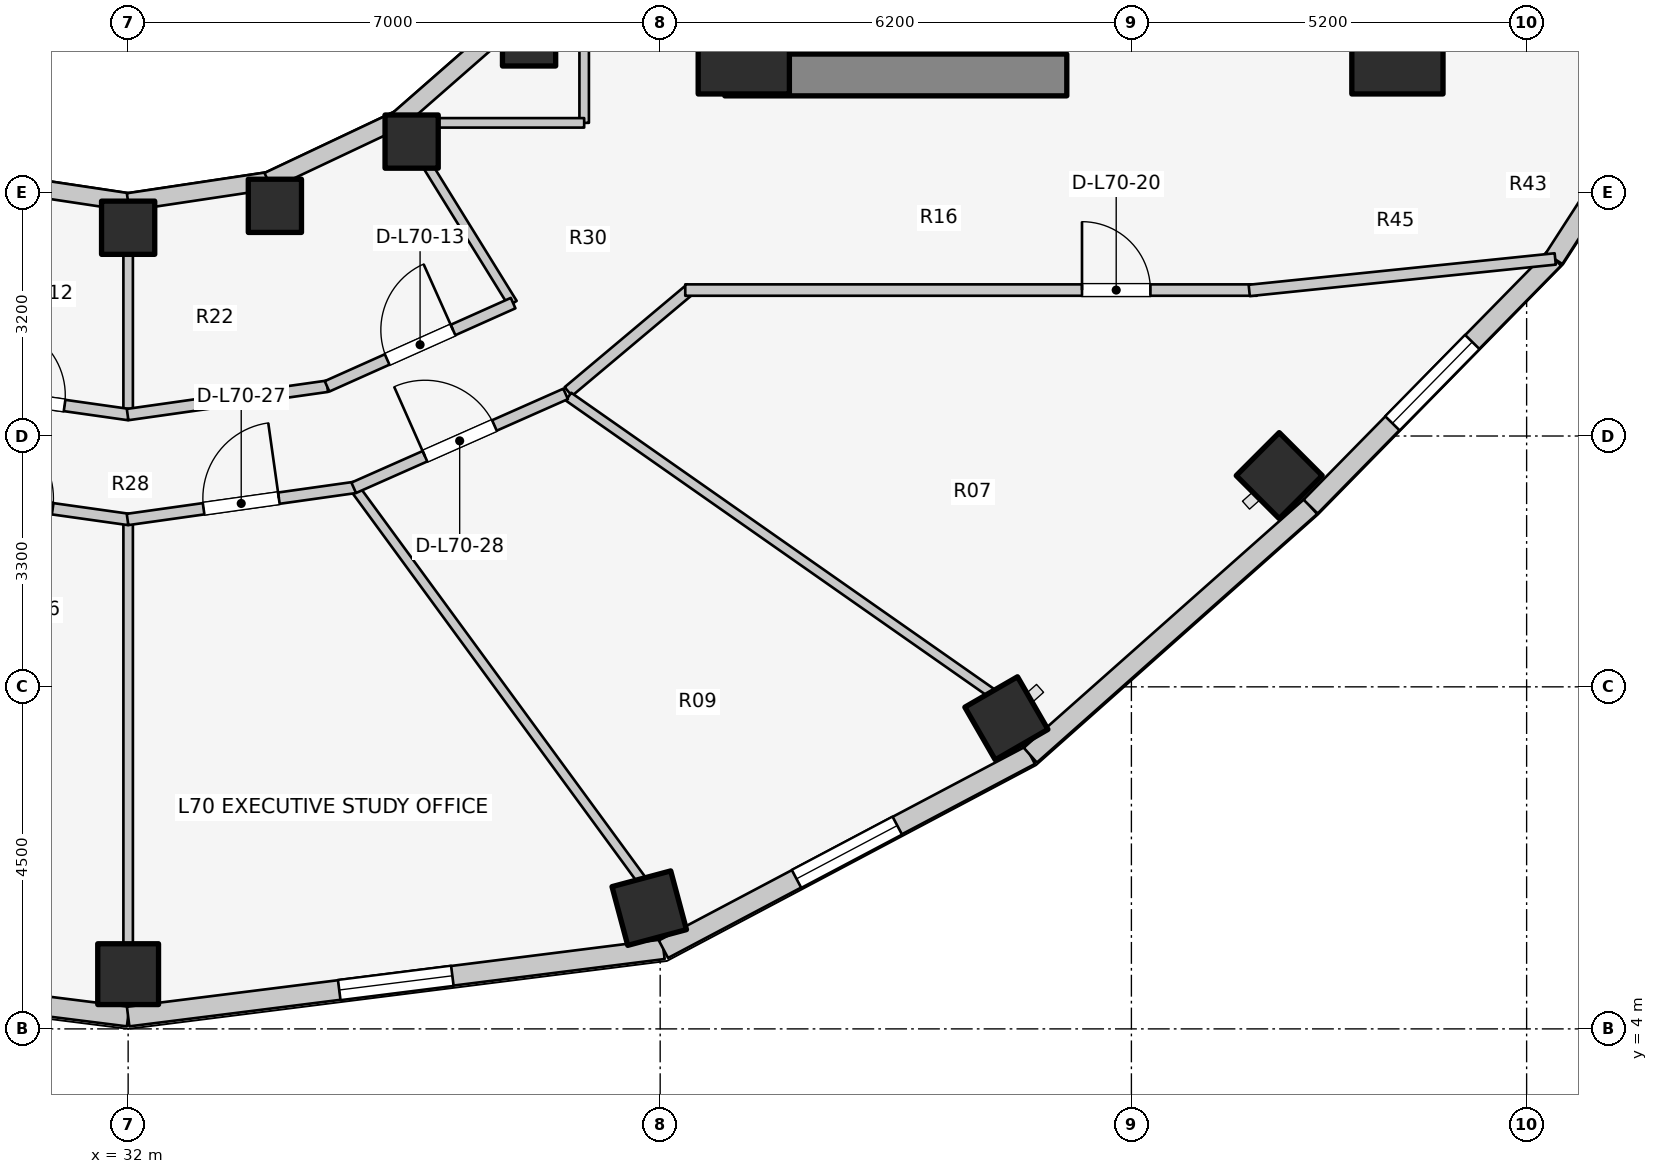
"""IFC4 building model, lengths in metres.
Left out: names, types, materials, properties, quantities, classifications, styles, units other than length and angle.
Written with IfcOpenShell. Run it as: python <this file> out.ifc"""

import sys

from ifc_helpers import new_model, si_unit, direction, frame, frame_2d, origin, origin_2d, place, context, subcontext, project, spatial, rectangle, extrude, element, fill, save


model = new_model("IFC4")
c1 = context("Model", 3, precision=1e-05, world=origin(), true_north=direction((0.0, 1.0)))
c2 = subcontext(c1, "Body", "Model", "MODEL_VIEW")
j1 = project(units=[si_unit("LENGTHUNIT", "METRE"), si_unit("PLANEANGLEUNIT", "RADIAN")], contexts=[c1])
p1 = place(None, origin())
s1 = spatial("IfcSite", under=j1, at=p1, CompositionType="ELEMENT")
p2 = place(p1, origin())
s2 = spatial("IfcBuilding", under=s1, at=p2, CompositionType="ELEMENT")
p3 = place(p2, frame((0.0, 0.0, 229.5)))
s3 = spatial("IfcBuildingStorey", under=s2, at=p3, CompositionType="ELEMENT", Elevation=229.5)
p4 = place(p3, frame((39.85, 16.55, 0.0), z_axis=(0.0, 0.0, 1.0), x_axis=(1.0, 0.0, 0.0)))
e1 = element("IfcWall", 1, at=p4, inside=s3, PredefinedType="SHEAR", context=c2, shape_type="SweptSolid", body=[
    extrude(rectangle(XDim=4.5, YDim=0.55, at=frame_2d((2.25, 0.0))), origin(), (0.0, 0.0, 1.0), 3.1),
])
for number, where, z_axis, x_axis in (
    (2, (40.1, 16.9, 0.0), (0.0, 0.0, 1.0), (1.0, 0.0, 0.0)),
    (3, (48.7, 16.9, 0.0), (0.0, 0.0, 1.0), (1.0, 0.0, 0.0)),
):
    element("IfcColumn", number, at=place(p3, frame(where, z_axis=z_axis, x_axis=x_axis)), inside=s3, PredefinedType="COLUMN", context=c2, shape_type="SweptSolid", body=[
        extrude(rectangle(XDim=1.2, YDim=1.2, at=origin_2d()), origin(), (0.0, 0.0, 1.0), 3.1),
    ])
p5 = place(p3, frame((32.0, 14.54, 0.0), z_axis=(0.0, 0.0, 1.0), x_axis=(1.0, 0.0, 0.0)))
e4 = element("IfcColumn", 4, at=p5, inside=s3, PredefinedType="COLUMN", context=c2, shape_type="SweptSolid", body=[
    extrude(rectangle(XDim=0.7, YDim=0.7, at=origin_2d()), origin(), (0.0, 0.0, 1.0), 3.1),
])
p6 = place(p3, frame((32.0, 4.72, 0.0), z_axis=(0.0, 0.0, 1.0), x_axis=(0.0, -1.0, 0.0)))
e5 = element("IfcColumn", 5, at=p6, inside=s3, PredefinedType="COLUMN", context=c2, shape_type="SweptSolid", body=[
    extrude(rectangle(XDim=0.8, YDim=0.8, at=origin_2d()), origin(), (0.0, 0.0, 1.0), 3.1),
])
p7 = place(p3, frame((33.931, 14.828, 0.0), z_axis=(0.0, 0.0, 1.0), x_axis=(1.0, 0.0, 0.0)))
e6 = element("IfcColumn", 6, at=p7, inside=s3, PredefinedType="COLUMN", context=c2, shape_type="SweptSolid", body=[
    extrude(rectangle(XDim=0.7, YDim=0.7, at=origin_2d()), origin(), (0.0, 0.0, 1.0), 3.1),
])
p8 = place(p3, frame((38.856, 5.589, 0.0), z_axis=(0.0, 0.0, 1.0), x_axis=(0.258819045103, -0.965925826289, 0.0)))
e7 = element("IfcColumn", 7, at=p8, inside=s3, PredefinedType="COLUMN", context=c2, shape_type="SweptSolid", body=[
    extrude(rectangle(XDim=0.8, YDim=0.8, at=origin_2d()), origin(), (0.0, 0.0, 1.0), 3.1),
])
p9 = place(p3, frame((35.73, 15.673, 0.0), z_axis=(0.0, 0.0, 1.0), x_axis=(1.0, 0.0, 0.0)))
e8 = element("IfcColumn", 8, at=p9, inside=s3, PredefinedType="COLUMN", context=c2, shape_type="SweptSolid", body=[
    extrude(rectangle(XDim=0.7, YDim=0.7, at=origin_2d()), origin(), (0.0, 0.0, 1.0), 3.1),
])
p10 = place(p3, frame((43.555, 8.086, 0.0), z_axis=(0.0, 0.0, 1.0), x_axis=(0.5, -0.866025403784, 0.0)))
e9 = element("IfcColumn", 9, at=p10, inside=s3, PredefinedType="COLUMN", context=c2, shape_type="SweptSolid", body=[
    extrude(rectangle(XDim=0.8, YDim=0.8, at=origin_2d()), origin(), (0.0, 0.0, 1.0), 3.1),
])
p11 = place(p3, frame((37.275, 17.018, 0.0), z_axis=(0.0, 0.0, 1.0), x_axis=(1.0, 0.0, 0.0)))
e10 = element("IfcColumn", 10, at=p11, inside=s3, PredefinedType="COLUMN", context=c2, shape_type="SweptSolid", body=[
    extrude(rectangle(XDim=0.7, YDim=0.7, at=origin_2d()), origin(), (0.0, 0.0, 1.0), 3.1),
])
p12 = place(p3, frame((47.145, 11.279, 0.0), z_axis=(0.0, 0.0, 1.0), x_axis=(0.707106781187, -0.707106781187, 0.0)))
e11 = element("IfcColumn", 11, at=p12, inside=s3, PredefinedType="COLUMN", context=c2, shape_type="SweptSolid", body=[
    extrude(rectangle(XDim=0.8, YDim=0.8, at=origin_2d()), origin(), (0.0, 0.0, 1.0), 3.1),
])
for number, where, z_axis, x_axis in (
    (12, (30.157, 15.157, 0.0), (0.0, 0.0, 1.0), (0.989, -0.149, 0.0)),
    (13, (32.0, 14.88, 0.0), (0.0, 0.0, 1.0), (0.989, 0.149, 0.0)),
):
    element("IfcWall", number, at=place(p3, frame(where, z_axis=z_axis, x_axis=x_axis)), inside=s3, PredefinedType="STANDARD", context=c2, shape_type="SweptSolid", body=[
        extrude(rectangle(XDim=1.864, YDim=0.23, at=frame_2d((0.932, 0.0))), origin(), (0.0, 0.0, 1.0), 2.16),
    ])
p13 = place(p3, frame((33.843, 15.157, 0.0), z_axis=(0.0, 0.0, 1.0), x_axis=(0.904179699603, 0.427152280606, 0.0)))
e14 = element("IfcWall", 14, at=p13, inside=s3, PredefinedType="STANDARD", context=c2, shape_type="SweptSolid", body=[
    extrude(rectangle(XDim=1.899, YDim=0.23, at=frame_2d((0.95, 0.0))), origin(), (0.0, 0.0, 1.0), 2.16),
])
p14 = place(p3, frame((35.56, 15.968, 0.0), z_axis=(0.0, 0.0, 1.0), x_axis=(0.752576694707, 0.658504607869, 0.0)))
e15 = element("IfcWall", 15, at=p14, inside=s3, PredefinedType="STANDARD", context=c2, shape_type="SweptSolid", body=[
    extrude(rectangle(XDim=1.959, YDim=0.23, at=frame_2d((0.98, 0.0))), origin(), (0.0, 0.0, 1.0), 2.16),
])
p15 = place(p3, frame((24.957, 5.048, 0.0), z_axis=(0.0, 0.0, 1.0), x_axis=(0.992180211307, -0.124813574142, 0.0)))
e16 = element("IfcWall", 16, at=p15, inside=s3, PredefinedType="STANDARD", context=c2, shape_type="SweptSolid", body=[
    extrude(rectangle(XDim=7.098, YDim=0.26, at=frame_2d((3.549, 0.0))), origin(), (0.0, 0.0, 1.0), 2.85),
])
p16 = place(p15, frame((2.349, 0.0, 0.75)))
e17 = element("IfcOpeningElement", 17, at=p16, cuts=e16, PredefinedType="OPENING", context=c2, shape_type="SweptSolid", body=[
    extrude(rectangle(XDim=2.4, YDim=1.7, at=frame_2d((1.2, 0.85))), frame((0.0, 0.14, 0.0), z_axis=(0.0, -1.0, 0.0), x_axis=(1.0, 0.0, 0.0)), (0.0, 0.0, 1.0), 0.28),
])
p17 = place(p3, frame((32.0, 4.162, 0.0), z_axis=(0.0, 0.0, 1.0), x_axis=(0.992180211307, 0.124813574142, 0.0)))
e18 = element("IfcWall", 18, at=p17, inside=s3, PredefinedType="STANDARD", context=c2, shape_type="SweptSolid", body=[
    extrude(rectangle(XDim=7.098, YDim=0.26, at=frame_2d((3.549, 0.0))), origin(), (0.0, 0.0, 1.0), 2.85),
])
p18 = place(p17, frame((2.799, 0.0, 0.75)))
e19 = element("IfcOpeningElement", 19, at=p18, cuts=e18, PredefinedType="OPENING", context=c2, shape_type="SweptSolid", body=[
    extrude(rectangle(XDim=1.5, YDim=1.6, at=frame_2d((0.75, 0.8))), frame((0.0, 0.14, 0.0), z_axis=(0.0, -1.0, 0.0), x_axis=(1.0, 0.0, 0.0)), (0.0, 0.0, 1.0), 0.28),
])
p19 = place(p3, frame((39.043, 5.048, 0.0), z_axis=(0.0, 0.0, 1.0), x_axis=(0.884000981341, 0.46748504253, 0.0)))
e20 = element("IfcWall", 20, at=p19, inside=s3, PredefinedType="STANDARD", context=c2, shape_type="SweptSolid", body=[
    extrude(rectangle(XDim=5.46, YDim=0.26, at=frame_2d((2.73, 0.0))), origin(), (0.0, 0.0, 1.0), 2.85),
])
p20 = place(p19, frame((1.98, 0.0, 0.75)))
e21 = element("IfcOpeningElement", 21, at=p20, cuts=e20, PredefinedType="OPENING", context=c2, shape_type="SweptSolid", body=[
    extrude(rectangle(XDim=1.5, YDim=1.6, at=frame_2d((0.75, 0.8))), frame((0.0, 0.14, 0.0), z_axis=(0.0, -1.0, 0.0), x_axis=(1.0, 0.0, 0.0)), (0.0, 0.0, 1.0), 0.28),
])
p21 = place(p3, frame((43.87, 7.601, 0.0), z_axis=(0.0, 0.0, 1.0), x_axis=(0.748165854006, 0.663511759428, 0.0)))
e22 = element("IfcWall", 22, at=p21, inside=s3, PredefinedType="STANDARD", context=c2, shape_type="SweptSolid", body=[
    extrude(rectangle(XDim=4.929, YDim=0.26, at=frame_2d((2.464, 0.0))), origin(), (0.0, 0.0, 1.0), 2.85),
])
p22 = place(p3, frame((47.558, 10.871, 0.0), z_axis=(0.0, 0.0, 1.0), x_axis=(0.700642973333, 0.713512034881, 0.0)))
e23 = element("IfcWall", 23, at=p22, inside=s3, PredefinedType="STANDARD", context=c2, shape_type="SweptSolid", body=[
    extrude(rectangle(XDim=4.572, YDim=0.26, at=frame_2d((2.286, 0.0))), origin(), (0.0, 0.0, 1.0), 2.85),
])
p23 = place(p22, frame((1.536, 0.0, 0.75)))
e24 = element("IfcOpeningElement", 24, at=p23, cuts=e23, PredefinedType="OPENING", context=c2, shape_type="SweptSolid", body=[
    extrude(rectangle(XDim=1.5, YDim=1.6, at=frame_2d((0.75, 0.8))), frame((0.0, 0.14, 0.0), z_axis=(0.0, -1.0, 0.0), x_axis=(1.0, 0.0, 0.0)), (0.0, 0.0, 1.0), 0.28),
])
p24 = place(p3, frame((50.761, 14.133, 0.0), z_axis=(0.0, 0.0, 1.0), x_axis=(0.542641766008, 0.839964233634, 0.0)))
e25 = element("IfcWall", 25, at=p24, inside=s3, PredefinedType="STANDARD", context=c2, shape_type="SweptSolid", body=[
    extrude(rectangle(XDim=4.319, YDim=0.26, at=frame_2d((2.16, 0.0))), origin(), (0.0, 0.0, 1.0), 2.85),
])
p25 = place(p24, frame((1.41, 0.0, 0.75)))
e26 = element("IfcOpeningElement", 26, at=p25, cuts=e25, PredefinedType="OPENING", context=c2, shape_type="SweptSolid", body=[
    extrude(rectangle(XDim=1.5, YDim=1.6, at=frame_2d((0.75, 0.8))), frame((0.0, 0.14, 0.0), z_axis=(0.0, -1.0, 0.0), x_axis=(1.0, 0.0, 0.0)), (0.0, 0.0, 1.0), 0.28),
])
p26 = place(p3, frame((32.0, 14.9, 0.0), z_axis=(0.0, 0.0, 1.0), x_axis=(0.0, -1.0, 0.0)))
e27 = element("IfcWall", 27, at=p26, inside=s3, PredefinedType="PARTITIONING", context=c2, shape_type="SweptSolid", body=[
    extrude(rectangle(XDim=2.818, YDim=0.125, at=frame_2d((1.409, 0.0))), origin(), (0.0, 0.0, 1.0), 2.376),
])
p27 = place(p3, frame((35.55, 15.985, 0.0), z_axis=(0.0, 0.0, 1.0), x_axis=(0.52592395012, -0.850531597702, 0.0)))
e28 = element("IfcWall", 28, at=p27, inside=s3, PredefinedType="PARTITIONING", context=c2, shape_type="SweptSolid", body=[
    extrude(rectangle(XDim=2.869, YDim=0.125, at=frame_2d((1.435, 0.0))), origin(), (0.0, 0.0, 1.0), 2.376),
])
p28 = place(p3, frame((29.38, 12.455, 0.0), z_axis=(0.0, 0.0, 1.0), x_axis=(0.990096156252, -0.140390887794, 0.0)))
e29 = element("IfcWall", 29, at=p28, inside=s3, PredefinedType="PARTITIONING", context=c2, shape_type="SweptSolid", body=[
    extrude(rectangle(XDim=2.654, YDim=0.15, at=frame_2d((1.327, 0.0))), origin(), (0.0, 0.0, 1.0), 2.376),
])
p29 = place(p28, frame((0.852, 0.0, 0.0)))
e30 = element("IfcOpeningElement", 30, at=p29, cuts=e29, PredefinedType="OPENING", context=c2, shape_type="SweptSolid", body=[
    extrude(rectangle(XDim=0.95, YDim=2.1, at=frame_2d((0.475, 1.05))), frame((0.0, 0.085, 0.0), z_axis=(0.0, -1.0, 0.0), x_axis=(1.0, 0.0, 0.0)), (0.0, 0.0, 1.0), 0.17),
])
p30 = place(p3, frame((31.993, 12.082, 0.0), z_axis=(0.0, 0.0, 1.0), x_axis=(0.990096156252, 0.140390887794, 0.0)))
e31 = element("IfcWall", 31, at=p30, inside=s3, PredefinedType="PARTITIONING", context=c2, shape_type="SweptSolid", body=[
    extrude(rectangle(XDim=2.654, YDim=0.15, at=frame_2d((1.327, 0.0))), origin(), (0.0, 0.0, 1.0), 2.376),
])
p31 = place(p3, frame((34.617, 12.454, 0.0), z_axis=(0.0, 0.0, 1.0), x_axis=(0.912859324183, 0.408274239027, 0.0)))
e32 = element("IfcWall", 32, at=p31, inside=s3, PredefinedType="PARTITIONING", context=c2, shape_type="SweptSolid", body=[
    extrude(rectangle(XDim=2.682, YDim=0.15, at=frame_2d((1.341, 0.0))), origin(), (0.0, 0.0, 1.0), 2.376),
])
p32 = place(p31, frame((0.866, 0.0, 0.0)))
e33 = element("IfcOpeningElement", 33, at=p32, cuts=e32, PredefinedType="OPENING", context=c2, shape_type="SweptSolid", body=[
    extrude(rectangle(XDim=0.95, YDim=2.1, at=frame_2d((0.475, 1.05))), frame((0.0, 0.085, 0.0), z_axis=(0.0, -1.0, 0.0), x_axis=(1.0, 0.0, 0.0)), (0.0, 0.0, 1.0), 0.17),
])
p33 = place(p3, frame((38.0, 15.92, 0.0), z_axis=(0.0, 0.0, 1.0), x_axis=(0.0, 1.0, 0.0)))
e34 = element("IfcWall", 34, at=p33, inside=s3, PredefinedType="PARTITIONING", context=c2, shape_type="SweptSolid", body=[
    extrude(rectangle(XDim=4.28, YDim=0.125, at=frame_2d((2.14, 0.0))), origin(), (0.0, 0.0, 1.0), 2.232),
])
p34 = place(p3, frame((35.4, 15.92, 0.0), z_axis=(0.0, 0.0, 1.0), x_axis=(1.0, 0.0, 0.0)))
e35 = element("IfcWall", 35, at=p34, inside=s3, PredefinedType="PARTITIONING", context=c2, shape_type="SweptSolid", body=[
    extrude(rectangle(XDim=2.6, YDim=0.125, at=frame_2d((1.3, 0.0))), origin(), (0.0, 0.0, 1.0), 2.232),
])
p35 = place(p3, frame((37.791, 12.385, 0.0), z_axis=(0.0, 0.0, 1.0), x_axis=(0.765677451641, 0.643224719711, 0.0)))
e36 = element("IfcWall", 36, at=p35, inside=s3, PredefinedType="PARTITIONING", context=c2, shape_type="SweptSolid", body=[
    extrude(rectangle(XDim=2.105, YDim=0.15, at=frame_2d((1.053, 0.0))), origin(), (0.0, 0.0, 1.0), 2.376),
])
p36 = place(p3, frame((39.33, 13.72, 0.0), z_axis=(0.0, 0.0, 1.0), x_axis=(1.0, 0.0, 0.0)))
e37 = element("IfcWall", 37, at=p36, inside=s3, PredefinedType="PARTITIONING", context=c2, shape_type="SweptSolid", body=[
    extrude(rectangle(XDim=7.52, YDim=0.15, at=frame_2d((3.76, 0.0))), origin(), (0.0, 0.0, 1.0), 2.376),
])
p37 = place(p36, frame((5.22, 0.0, 0.0)))
e38 = element("IfcOpeningElement", 38, at=p37, cuts=e37, PredefinedType="OPENING", context=c2, shape_type="SweptSolid", body=[
    extrude(rectangle(XDim=0.9, YDim=2.1, at=frame_2d((0.45, 1.05))), frame((0.0, 0.085, 0.0), z_axis=(0.0, -1.0, 0.0), x_axis=(1.0, 0.0, 0.0)), (0.0, 0.0, 1.0), 0.17),
])
p38 = place(p3, frame((46.75, 13.715, 0.0), z_axis=(0.0, 0.0, 1.0), x_axis=(0.994734711466, 0.102483431859, 0.0)))
e39 = element("IfcWall", 39, at=p38, inside=s3, PredefinedType="PARTITIONING", context=c2, shape_type="SweptSolid", body=[
    extrude(rectangle(XDim=4.047, YDim=0.15, at=frame_2d((2.024, 0.0))), origin(), (0.0, 0.0, 1.0), 2.22),
])
p39 = place(p3, frame((32.0, 10.647, 0.0), z_axis=(0.0, 0.0, 1.0), x_axis=(0.0, -1.0, 0.0)))
e40 = element("IfcWall", 40, at=p39, inside=s3, PredefinedType="PARTITIONING", context=c2, shape_type="SweptSolid", body=[
    extrude(rectangle(XDim=5.547, YDim=0.125, at=frame_2d((2.773, 0.0))), origin(), (0.0, 0.0, 1.0), 2.376),
])
p40 = place(p3, frame((35.008, 11.077, 0.0), z_axis=(0.0, 0.0, 1.0), x_axis=(0.590771495169, -0.806838918555, 0.0)))
e41 = element("IfcWall", 41, at=p40, inside=s3, PredefinedType="PARTITIONING", context=c2, shape_type="SweptSolid", body=[
    extrude(rectangle(XDim=6.347, YDim=0.125, at=frame_2d((3.173, 0.0))), origin(), (0.0, 0.0, 1.0), 2.376),
])
p41 = place(p3, frame((37.794, 12.318, 0.0), z_axis=(0.0, 0.0, 1.0), x_axis=(0.819017716307, -0.573768228796, 0.0)))
e42 = element("IfcWall", 42, at=p41, inside=s3, PredefinedType="PARTITIONING", context=c2, shape_type="SweptSolid", body=[
    extrude(rectangle(XDim=6.802, YDim=0.125, at=frame_2d((3.401, 0.0))), origin(), (0.0, 0.0, 1.0), 2.376),
])
p42 = place(p3, frame((29.016, 11.123, 0.0), z_axis=(0.0, 0.0, 1.0), x_axis=(0.990225561979, -0.139475217886, 0.0)))
e43 = element("IfcWall", 43, at=p42, inside=s3, PredefinedType="PARTITIONING", context=c2, shape_type="SweptSolid", body=[
    extrude(rectangle(XDim=3.021, YDim=0.15, at=frame_2d((1.511, 0.0))), origin(), (0.0, 0.0, 1.0), 2.376),
])
p43 = place(p42, frame((1.01, 0.0, 0.0)))
e44 = element("IfcOpeningElement", 44, at=p43, cuts=e43, PredefinedType="OPENING", context=c2, shape_type="SweptSolid", body=[
    extrude(rectangle(XDim=1.0, YDim=2.1, at=frame_2d((0.5, 1.05))), frame((0.0, 0.085, 0.0), z_axis=(0.0, -1.0, 0.0), x_axis=(1.0, 0.0, 0.0)), (0.0, 0.0, 1.0), 0.17),
])
p44 = place(p3, frame((31.992, 10.702, 0.0), z_axis=(0.0, 0.0, 1.0), x_axis=(0.990225561979, 0.139475217886, 0.0)))
e45 = element("IfcWall", 45, at=p44, inside=s3, PredefinedType="PARTITIONING", context=c2, shape_type="SweptSolid", body=[
    extrude(rectangle(XDim=3.021, YDim=0.15, at=frame_2d((1.511, 0.0))), origin(), (0.0, 0.0, 1.0), 2.376),
])
p45 = place(p44, frame((1.01, 0.0, 0.0)))
e46 = element("IfcOpeningElement", 46, at=p45, cuts=e45, PredefinedType="OPENING", context=c2, shape_type="SweptSolid", body=[
    extrude(rectangle(XDim=1.0, YDim=2.1, at=frame_2d((0.5, 1.05))), frame((0.0, 0.085, 0.0), z_axis=(0.0, -1.0, 0.0), x_axis=(1.0, 0.0, 0.0)), (0.0, 0.0, 1.0), 0.17),
])
p46 = place(p3, frame((34.968, 11.119, 0.0), z_axis=(0.0, 0.0, 1.0), x_axis=(0.914302802833, 0.405031337963, 0.0)))
e47 = element("IfcWall", 47, at=p46, inside=s3, PredefinedType="PARTITIONING", context=c2, shape_type="SweptSolid", body=[
    extrude(rectangle(XDim=3.049, YDim=0.15, at=frame_2d((1.525, 0.0))), origin(), (0.0, 0.0, 1.0), 2.376),
])
p47 = place(p46, frame((1.025, 0.0, 0.0)))
e48 = element("IfcOpeningElement", 48, at=p47, cuts=e47, PredefinedType="OPENING", context=c2, shape_type="SweptSolid", body=[
    extrude(rectangle(XDim=1.0, YDim=2.1, at=frame_2d((0.5, 1.05))), frame((0.0, 0.085, 0.0), z_axis=(0.0, -1.0, 0.0), x_axis=(1.0, 0.0, 0.0)), (0.0, 0.0, 1.0), 0.17),
])
p48 = place(p18, origin())
e49 = element("IfcWindow", 49, at=p48, inside=s3, PartitioningType="SINGLE_PANEL", PredefinedType="WINDOW", context=c2, shape_type="SweptSolid", body=[
    extrude(rectangle(XDim=1.5, YDim=1.6, at=frame_2d((0.75, 0.8))), frame((0.0, 0.03, 0.0), z_axis=(0.0, -1.0, 0.0), x_axis=(1.0, 0.0, 0.0)), (0.0, 0.0, 1.0), 0.06),
])
fill(e19, e49)
p49 = place(p20, origin())
e50 = element("IfcWindow", 50, at=p49, inside=s3, PartitioningType="SINGLE_PANEL", PredefinedType="WINDOW", context=c2, shape_type="SweptSolid", body=[
    extrude(rectangle(XDim=1.5, YDim=1.6, at=frame_2d((0.75, 0.8))), frame((0.0, 0.03, 0.0), z_axis=(0.0, -1.0, 0.0), x_axis=(1.0, 0.0, 0.0)), (0.0, 0.0, 1.0), 0.06),
])
fill(e21, e50)
p50 = place(p23, origin())
e51 = element("IfcWindow", 51, at=p50, inside=s3, PartitioningType="SINGLE_PANEL", PredefinedType="WINDOW", context=c2, shape_type="SweptSolid", body=[
    extrude(rectangle(XDim=1.5, YDim=1.6, at=frame_2d((0.75, 0.8))), frame((0.0, 0.03, 0.0), z_axis=(0.0, -1.0, 0.0), x_axis=(1.0, 0.0, 0.0)), (0.0, 0.0, 1.0), 0.06),
])
fill(e24, e51)
p51 = place(p29, origin())
e52 = element("IfcDoor", 52, at=p51, inside=s3, OperationType="SINGLE_SWING_LEFT", PredefinedType="DOOR", context=c2, shape_type="SweptSolid", body=[
    extrude(rectangle(XDim=0.95, YDim=2.1, at=frame_2d((0.475, 1.05))), frame((0.0, 0.025, 0.0), z_axis=(0.0, -1.0, 0.0), x_axis=(1.0, 0.0, 0.0)), (0.0, 0.0, 1.0), 0.05),
])
fill(e30, e52)
p52 = place(p32, origin())
e53 = element("IfcDoor", 53, at=p52, inside=s3, OperationType="SINGLE_SWING_RIGHT", PredefinedType="DOOR", context=c2, shape_type="SweptSolid", body=[
    extrude(rectangle(XDim=0.95, YDim=2.1, at=frame_2d((0.475, 1.05))), frame((0.0, 0.025, 0.0), z_axis=(0.0, -1.0, 0.0), x_axis=(1.0, 0.0, 0.0)), (0.0, 0.0, 1.0), 0.05),
])
fill(e33, e53)
p53 = place(p37, origin())
e54 = element("IfcDoor", 54, at=p53, inside=s3, OperationType="SINGLE_SWING_LEFT", PredefinedType="DOOR", context=c2, shape_type="SweptSolid", body=[
    extrude(rectangle(XDim=0.9, YDim=2.1, at=frame_2d((0.45, 1.05))), frame((0.0, 0.025, 0.0), z_axis=(0.0, -1.0, 0.0), x_axis=(1.0, 0.0, 0.0)), (0.0, 0.0, 1.0), 0.05),
])
fill(e38, e54)
p54 = place(p43, origin())
e55 = element("IfcDoor", 55, at=p54, inside=s3, OperationType="SINGLE_SWING_LEFT", PredefinedType="DOOR", context=c2, shape_type="SweptSolid", body=[
    extrude(rectangle(XDim=1.0, YDim=2.1, at=frame_2d((0.5, 1.05))), frame((0.0, 0.025, 0.0), z_axis=(0.0, -1.0, 0.0), x_axis=(1.0, 0.0, 0.0)), (0.0, 0.0, 1.0), 0.05),
])
fill(e44, e55)
p55 = place(p45, origin())
e56 = element("IfcDoor", 56, at=p55, inside=s3, OperationType="SINGLE_SWING_RIGHT", PredefinedType="DOOR", context=c2, shape_type="SweptSolid", body=[
    extrude(rectangle(XDim=1.0, YDim=2.1, at=frame_2d((0.5, 1.05))), frame((0.0, 0.025, 0.0), z_axis=(0.0, -1.0, 0.0), x_axis=(1.0, 0.0, 0.0)), (0.0, 0.0, 1.0), 0.05),
])
fill(e46, e56)
p56 = place(p47, origin())
e57 = element("IfcDoor", 57, at=p56, inside=s3, OperationType="SINGLE_SWING_LEFT", PredefinedType="DOOR", context=c2, shape_type="SweptSolid", body=[
    extrude(rectangle(XDim=1.0, YDim=2.1, at=frame_2d((0.5, 1.05))), frame((0.0, 0.025, 0.0), z_axis=(0.0, -1.0, 0.0), x_axis=(1.0, 0.0, 0.0)), (0.0, 0.0, 1.0), 0.05),
])
fill(e48, e57)
save(model, sys.argv[1])
